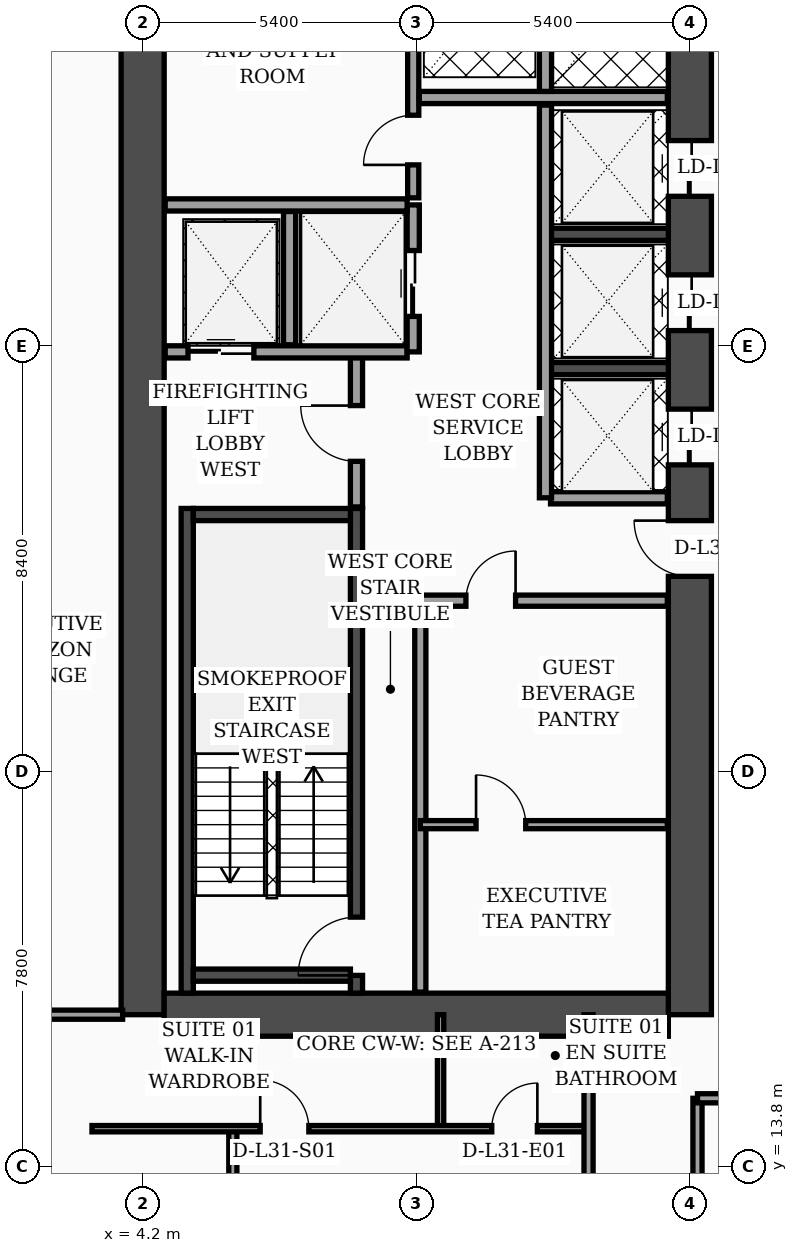
"""IFC4 building model, lengths in metres.
Left out: names, types, materials, properties, quantities, classifications, styles, units other than length and angle.
Written with IfcOpenShell. Run it as: python <this file> out.ifc"""

import sys

from ifc_helpers import new_model, si_unit, direction, frame, frame_2d, origin, place, context, subcontext, project, spatial, rectangle, extrude, element, fill, save


model = new_model("IFC4")
c1 = context("Model", 3, precision=1e-05, world=origin(), true_north=direction((0.0, 1.0)))
c2 = subcontext(c1, "Body", "Model", "MODEL_VIEW")
j1 = project(units=[si_unit("LENGTHUNIT", "METRE"), si_unit("PLANEANGLEUNIT", "RADIAN")], contexts=[c1])
p1 = place(None, origin())
s1 = spatial("IfcSite", under=j1, at=p1, CompositionType="ELEMENT")
p2 = place(p1, origin())
s2 = spatial("IfcBuilding", under=s1, at=p2, CompositionType="ELEMENT")
p3 = place(p2, frame((0.0, 0.0, 127.8)))
s3 = spatial("IfcBuildingStorey", under=s2, at=p3, CompositionType="ELEMENT", Elevation=127.8)
p4 = place(p3, frame((4.2, 16.8, 0.0), z_axis=(0.0, 0.0, 1.0), x_axis=(0.0, 1.0, 0.0)))
e1 = element("IfcWall", 1, at=p4, inside=s3, PredefinedType="SHEAR", context=c2, shape_type="SweptSolid", body=[
    extrude(rectangle(XDim=21.6, YDim=0.85, at=frame_2d((10.8, 0.0))), origin(), (0.0, 0.0, 1.0), 3.56),
])
p5 = place(p3, frame((15.0, 16.8, 0.0), z_axis=(0.0, 0.0, 1.0), x_axis=(0.0, 1.0, 0.0)))
e2 = element("IfcWall", 2, at=p5, inside=s3, PredefinedType="SHEAR", context=c2, shape_type="SweptSolid", body=[
    extrude(rectangle(XDim=21.6, YDim=0.85, at=frame_2d((10.8, 0.0))), origin(), (0.0, 0.0, 1.0), 3.56),
])
p6 = place(p5, frame((8.65, 0.0, 0.0)))
e3 = element("IfcOpeningElement", 3, at=p6, cuts=e2, PredefinedType="OPENING", context=c2, shape_type="SweptSolid", body=[
    extrude(rectangle(XDim=1.1, YDim=2.2, at=frame_2d((0.55, 1.1))), frame((0.0, 0.435, 0.0), z_axis=(0.0, -1.0, 0.0), x_axis=(1.0, 0.0, 0.0)), (0.0, 0.0, 1.0), 0.87),
])
p7 = place(p5, frame((10.85, 0.0, 0.0)))
e4 = element("IfcOpeningElement", 4, at=p7, cuts=e2, PredefinedType="OPENING", context=c2, shape_type="SweptSolid", body=[
    extrude(rectangle(XDim=1.1, YDim=2.2, at=frame_2d((0.55, 1.1))), frame((0.0, 0.435, 0.0), z_axis=(0.0, -1.0, 0.0), x_axis=(1.0, 0.0, 0.0)), (0.0, 0.0, 1.0), 0.87),
])
p8 = place(p5, frame((13.5, 0.0, 0.0)))
e5 = element("IfcOpeningElement", 5, at=p8, cuts=e2, PredefinedType="OPENING", context=c2, shape_type="SweptSolid", body=[
    extrude(rectangle(XDim=1.1, YDim=2.2, at=frame_2d((0.55, 1.1))), frame((0.0, 0.435, 0.0), z_axis=(0.0, -1.0, 0.0), x_axis=(1.0, 0.0, 0.0)), (0.0, 0.0, 1.0), 0.87),
])
p9 = place(p5, frame((16.15, 0.0, 0.0)))
e6 = element("IfcOpeningElement", 6, at=p9, cuts=e2, PredefinedType="OPENING", context=c2, shape_type="SweptSolid", body=[
    extrude(rectangle(XDim=1.1, YDim=2.2, at=frame_2d((0.55, 1.1))), frame((0.0, 0.435, 0.0), z_axis=(0.0, -1.0, 0.0), x_axis=(1.0, 0.0, 0.0)), (0.0, 0.0, 1.0), 0.87),
])
p10 = place(p3, frame((4.625, 16.8, 0.0), z_axis=(0.0, 0.0, 1.0), x_axis=(1.0, 0.0, 0.0)))
e7 = element("IfcWall", 7, at=p10, inside=s3, PredefinedType="SHEAR", context=c2, shape_type="SweptSolid", body=[
    extrude(rectangle(XDim=9.95, YDim=0.85, at=frame_2d((4.975, 0.0))), origin(), (0.0, 0.0, 1.0), 3.56),
])
p11 = place(p3, frame((5.08, 17.225, 0.0), z_axis=(0.0, 0.0, 1.0), x_axis=(0.0, 1.0, 0.0)))
e8 = element("IfcWall", 8, at=p11, inside=s3, PredefinedType="SOLIDWALL", context=c2, shape_type="SweptSolid", body=[
    extrude(rectangle(XDim=9.565, YDim=0.24, at=frame_2d((4.782, 0.0))), origin(), (0.0, 0.0, 1.0), 3.56),
])
p12 = place(p3, frame((8.42, 17.225, 0.0), z_axis=(0.0, 0.0, 1.0), x_axis=(0.0, 1.0, 0.0)))
e9 = element("IfcWall", 9, at=p12, inside=s3, PredefinedType="SOLIDWALL", context=c2, shape_type="SweptSolid", body=[
    extrude(rectangle(XDim=9.565, YDim=0.24, at=frame_2d((4.782, 0.0))), origin(), (0.0, 0.0, 1.0), 3.56),
])
p13 = place(p12, frame((0.35, 0.0, 0.0)))
e10 = element("IfcOpeningElement", 10, at=p13, cuts=e9, PredefinedType="OPENING", context=c2, shape_type="SweptSolid", body=[
    extrude(rectangle(XDim=1.15, YDim=2.2, at=frame_2d((0.575, 1.1))), frame((0.0, 0.13, 0.0), z_axis=(0.0, -1.0, 0.0), x_axis=(1.0, 0.0, 0.0)), (0.0, 0.0, 1.0), 0.26),
])
for number, where, z_axis, x_axis in (
    (11, (5.2, 17.58, 0.0), (0.0, 0.0, 1.0), (1.0, 0.0, 0.0)),
    (12, (5.2, 26.67, 0.0), (0.0, 0.0, 1.0), (1.0, 0.0, 0.0)),
):
    element("IfcWall", number, at=place(p3, frame(where, z_axis=z_axis, x_axis=x_axis)), inside=s3, PredefinedType="SOLIDWALL", context=c2, shape_type="SweptSolid", body=[
        extrude(rectangle(XDim=3.1, YDim=0.24, at=frame_2d((1.55, 0.0))), origin(), (0.0, 0.0, 1.0), 3.56),
    ])
for number, where, z_axis, x_axis in (
    (13, (12.18, 29.55, 0.0), (0.0, 0.0, 1.0), (1.0, 0.0, 0.0)),
    (14, (12.18, 32.2, 0.0), (0.0, 0.0, 1.0), (1.0, 0.0, 0.0)),
):
    element("IfcWall", number, at=place(p3, frame(where, z_axis=z_axis, x_axis=x_axis)), inside=s3, PredefinedType="SOLIDWALL", context=c2, shape_type="SweptSolid", body=[
        extrude(rectangle(XDim=2.395, YDim=0.24, at=frame_2d((1.198, 0.0))), origin(), (0.0, 0.0, 1.0), 3.56),
    ])
p14 = place(p3, frame((8.42, 26.82, 0.0), z_axis=(0.0, 0.0, 1.0), x_axis=(0.0, 1.0, 0.0)))
e15 = element("IfcWall", 15, at=p14, inside=s3, PredefinedType="SOLIDWALL", context=c2, shape_type="SweptSolid", body=[
    extrude(rectangle(XDim=3.0, YDim=0.24, at=frame_2d((1.5, 0.0))), origin(), (0.0, 0.0, 1.0), 3.56),
])
p15 = place(p14, frame((0.9, 0.0, 0.0)))
e16 = element("IfcOpeningElement", 16, at=p15, cuts=e15, PredefinedType="OPENING", context=c2, shape_type="SweptSolid", body=[
    extrude(rectangle(XDim=1.1, YDim=2.2, at=frame_2d((0.55, 1.1))), frame((0.0, 0.13, 0.0), z_axis=(0.0, -1.0, 0.0), x_axis=(1.0, 0.0, 0.0)), (0.0, 0.0, 1.0), 0.26),
])
p16 = place(p3, frame((4.645, 29.88, 0.0), z_axis=(0.0, 0.0, 1.0), x_axis=(1.0, 0.0, 0.0)))
e17 = element("IfcWall", 17, at=p16, inside=s3, PredefinedType="SOLIDWALL", context=c2, shape_type="SweptSolid", body=[
    extrude(rectangle(XDim=4.775, YDim=0.24, at=frame_2d((2.387, 0.0))), origin(), (0.0, 0.0, 1.0), 3.56),
])
p17 = place(p16, frame((0.45, 0.0, 0.0)))
e18 = element("IfcOpeningElement", 18, at=p17, cuts=e17, PredefinedType="OPENING", context=c2, shape_type="SweptSolid", body=[
    extrude(rectangle(XDim=1.3, YDim=2.35, at=frame_2d((0.65, 1.175))), frame((0.0, 0.13, 0.0), z_axis=(0.0, -1.0, 0.0), x_axis=(1.0, 0.0, 0.0)), (0.0, 0.0, 1.0), 0.26),
])
p18 = place(p3, frame((7.1, 30.02, 0.0), z_axis=(0.0, 0.0, 1.0), x_axis=(0.0, 1.0, 0.0)))
e19 = element("IfcWall", 19, at=p18, inside=s3, PredefinedType="SOLIDWALL", context=c2, shape_type="SweptSolid", body=[
    extrude(rectangle(XDim=2.63, YDim=0.24, at=frame_2d((1.315, 0.0))), origin(), (0.0, 0.0, 1.0), 3.56),
])
p19 = place(p3, frame((9.54, 29.88, 0.0), z_axis=(0.0, 0.0, 1.0), x_axis=(0.0, 1.0, 0.0)))
e20 = element("IfcWall", 20, at=p19, inside=s3, PredefinedType="SOLIDWALL", context=c2, shape_type="SweptSolid", body=[
    extrude(rectangle(XDim=2.9, YDim=0.24, at=frame_2d((1.45, 0.0))), origin(), (0.0, 0.0, 1.0), 3.56),
])
p20 = place(p19, frame((0.7, 0.0, 0.0)))
e21 = element("IfcOpeningElement", 21, at=p20, cuts=e20, PredefinedType="OPENING", context=c2, shape_type="SweptSolid", body=[
    extrude(rectangle(XDim=1.3, YDim=2.35, at=frame_2d((0.65, 1.175))), frame((0.0, 0.13, 0.0), z_axis=(0.0, -1.0, 0.0), x_axis=(1.0, 0.0, 0.0)), (0.0, 0.0, 1.0), 0.26),
])
p21 = place(p3, frame((4.645, 32.78, 0.0), z_axis=(0.0, 0.0, 1.0), x_axis=(1.0, 0.0, 0.0)))
e22 = element("IfcWall", 22, at=p21, inside=s3, PredefinedType="SOLIDWALL", context=c2, shape_type="SweptSolid", body=[
    extrude(rectangle(XDim=4.775, YDim=0.24, at=frame_2d((2.387, 0.0))), origin(), (0.0, 0.0, 1.0), 3.19),
])
p22 = place(p3, frame((9.68, 17.245, 0.0), z_axis=(0.0, 0.0, 1.0), x_axis=(0.0, 1.0, 0.0)))
e23 = element("IfcWall", 23, at=p22, inside=s3, PredefinedType="SOLIDWALL", context=c2, shape_type="SweptSolid", body=[
    extrude(rectangle(XDim=7.755, YDim=0.22, at=frame_2d((3.877, 0.0))), origin(), (0.0, 0.0, 1.0), 3.56),
])
p23 = place(p3, frame((9.54, 32.92, 0.0), z_axis=(0.0, 0.0, 1.0), x_axis=(0.0, 1.0, 0.0)))
e24 = element("IfcWall", 24, at=p23, inside=s3, PredefinedType="SOLIDWALL", context=c2, shape_type="SweptSolid", body=[
    extrude(rectangle(XDim=5.035, YDim=0.22, at=frame_2d((2.518, 0.0))), origin(), (0.0, 0.0, 1.0), 3.56),
])
p24 = place(p23, frame((0.65, 0.0, 0.0)))
e25 = element("IfcOpeningElement", 25, at=p24, cuts=e24, PredefinedType="OPENING", context=c2, shape_type="SweptSolid", body=[
    extrude(rectangle(XDim=0.98, YDim=2.15, at=frame_2d((0.49, 1.075))), frame((0.0, 0.12, 0.0), z_axis=(0.0, -1.0, 0.0), x_axis=(1.0, 0.0, 0.0)), (0.0, 0.0, 1.0), 0.24),
])
p25 = place(p3, frame((9.68, 20.55, 0.0), z_axis=(0.0, 0.0, 1.0), x_axis=(1.0, 0.0, 0.0)))
e26 = element("IfcWall", 26, at=p25, inside=s3, PredefinedType="PARTITIONING", context=c2, shape_type="SweptSolid", body=[
    extrude(rectangle(XDim=4.875, YDim=0.16, at=frame_2d((2.438, 0.0))), origin(), (0.0, 0.0, 1.0), 3.56),
])
p26 = place(p25, frame((1.1, 0.0, 0.0)))
e27 = element("IfcOpeningElement", 27, at=p26, cuts=e26, PredefinedType="OPENING", context=c2, shape_type="SweptSolid", body=[
    extrude(rectangle(XDim=0.98, YDim=2.15, at=frame_2d((0.49, 1.075))), frame((0.0, 0.09, 0.0), z_axis=(0.0, -1.0, 0.0), x_axis=(1.0, 0.0, 0.0)), (0.0, 0.0, 1.0), 0.18),
])
p27 = place(p3, frame((9.68, 24.97, 0.0), z_axis=(0.0, 0.0, 1.0), x_axis=(1.0, 0.0, 0.0)))
e28 = element("IfcWall", 28, at=p27, inside=s3, PredefinedType="SOLIDWALL", context=c2, shape_type="SweptSolid", body=[
    extrude(rectangle(XDim=4.875, YDim=0.22, at=frame_2d((2.438, 0.0))), origin(), (0.0, 0.0, 1.0), 2.84),
])
p28 = place(p27, frame((0.9, 0.0, 0.0)))
e29 = element("IfcOpeningElement", 29, at=p28, cuts=e28, PredefinedType="OPENING", context=c2, shape_type="SweptSolid", body=[
    extrude(rectangle(XDim=0.98, YDim=2.15, at=frame_2d((0.49, 1.075))), frame((0.0, 0.12, 0.0), z_axis=(0.0, -1.0, 0.0), x_axis=(1.0, 0.0, 0.0)), (0.0, 0.0, 1.0), 0.24),
])
p29 = place(p3, frame((12.25, 27.0, 0.0), z_axis=(0.0, 0.0, 1.0), x_axis=(1.0, 0.0, 0.0)))
e30 = element("IfcWall", 30, at=p29, inside=s3, PredefinedType="SOLIDWALL", context=c2, shape_type="SweptSolid", body=[
    extrude(rectangle(XDim=2.305, YDim=0.24, at=frame_2d((1.152, 0.0))), origin(), (0.0, 0.0, 1.0), 3.56),
])
p30 = place(p3, frame((12.15, 27.0, 0.0), z_axis=(0.0, 0.0, 1.0), x_axis=(0.0, 1.0, 0.0)))
e31 = element("IfcWall", 31, at=p30, inside=s3, PredefinedType="SOLIDWALL", context=c2, shape_type="SweptSolid", body=[
    extrude(rectangle(XDim=7.75, YDim=0.24, at=frame_2d((3.875, 0.0))), origin(), (0.0, 0.0, 1.0), 3.56),
])
p31 = place(p3, frame((9.66, 34.9, 0.0), z_axis=(0.0, 0.0, 1.0), x_axis=(1.0, 0.0, 0.0)))
e32 = element("IfcWall", 32, at=p31, inside=s3, PredefinedType="SOLIDWALL", context=c2, shape_type="SweptSolid", body=[
    extrude(rectangle(XDim=4.895, YDim=0.24, at=frame_2d((2.448, 0.0))), origin(), (0.0, 0.0, 1.0), 3.56),
])
p32 = place(p3, frame((12.15, 35.02, 0.0), z_axis=(0.0, 0.0, 1.0), x_axis=(0.0, 1.0, 0.0)))
e33 = element("IfcWall", 33, at=p32, inside=s3, PredefinedType="SOLIDWALL", context=c2, shape_type="SweptSolid", body=[
    extrude(rectangle(XDim=2.935, YDim=0.24, at=frame_2d((1.468, 0.0))), origin(), (0.0, 0.0, 1.0), 3.56),
])
p33 = place(p3, frame((0.08, 16.8, 0.0), z_axis=(0.0, 0.0, 1.0), x_axis=(1.0, 0.0, 0.0)))
e34 = element("IfcWall", 34, at=p33, inside=s3, PredefinedType="PARTITIONING", context=c2, shape_type="SweptSolid", body=[
    extrude(rectangle(XDim=3.725, YDim=0.18, at=frame_2d((1.862, 0.0))), origin(), (0.0, 0.0, 1.0), 2.84),
])
p34 = place(p3, frame((10.08, 14.55, 0.0), z_axis=(0.0, 0.0, 1.0), x_axis=(0.0, 1.0, 0.0)))
e35 = element("IfcWall", 35, at=p34, inside=s3, PredefinedType="PARTITIONING", context=c2, shape_type="SweptSolid", body=[
    extrude(rectangle(XDim=2.25, YDim=0.125, at=frame_2d((1.125, 0.0))), origin(), (0.0, 0.0, 1.0), 3.56),
])
p35 = place(p3, frame((5.98, 2.44, 0.0), z_axis=(0.0, 0.0, 1.0), x_axis=(0.0, 1.0, 0.0)))
e36 = element("IfcWall", 36, at=p35, inside=s3, PredefinedType="PARTITIONING", context=c2, shape_type="SweptSolid", body=[
    extrude(rectangle(XDim=12.11, YDim=0.16, at=frame_2d((6.055, 0.0))), origin(), (0.0, 0.0, 1.0), 3.04),
])
p36 = place(p35, frame((5.58, 0.0, 0.0)))
e37 = element("IfcOpeningElement", 37, at=p36, cuts=e36, PredefinedType="OPENING", context=c2, shape_type="SweptSolid", body=[
    extrude(rectangle(XDim=0.96, YDim=2.2, at=frame_2d((0.48, 1.1))), frame((0.0, 0.09, 0.0), z_axis=(0.0, -1.0, 0.0), x_axis=(1.0, 0.0, 0.0)), (0.0, 0.0, 1.0), 0.18),
])
p37 = place(p3, frame((3.2, 14.55, 0.0), z_axis=(0.0, 0.0, 1.0), x_axis=(1.0, 0.0, 0.0)))
e38 = element("IfcWall", 38, at=p37, inside=s3, PredefinedType="PARTITIONING", context=c2, shape_type="SweptSolid", body=[
    extrude(rectangle(XDim=9.8, YDim=0.125, at=frame_2d((4.9, 0.0))), origin(), (0.0, 0.0, 1.0), 2.84),
])
p38 = place(p37, frame((3.32, 0.0, 0.0)))
e39 = element("IfcOpeningElement", 39, at=p38, cuts=e38, PredefinedType="OPENING", context=c2, shape_type="SweptSolid", body=[
    extrude(rectangle(XDim=0.96, YDim=2.2, at=frame_2d((0.48, 1.1))), frame((0.0, 0.073, 0.0), z_axis=(0.0, -1.0, 0.0), x_axis=(1.0, 0.0, 0.0)), (0.0, 0.0, 1.0), 0.145),
])
p39 = place(p37, frame((7.89, 0.0, 0.0)))
e40 = element("IfcOpeningElement", 40, at=p39, cuts=e38, PredefinedType="OPENING", context=c2, shape_type="SweptSolid", body=[
    extrude(rectangle(XDim=0.9, YDim=2.15, at=frame_2d((0.45, 1.075))), frame((0.0, 0.073, 0.0), z_axis=(0.0, -1.0, 0.0), x_axis=(1.0, 0.0, 0.0)), (0.0, 0.0, 1.0), 0.145),
])
p40 = place(p3, frame((13.0, 2.44, 0.0), z_axis=(0.0, 0.0, 1.0), x_axis=(0.0, 1.0, 0.0)))
e41 = element("IfcWall", 41, at=p40, inside=s3, PredefinedType="PARTITIONING", context=c2, shape_type="SweptSolid", body=[
    extrude(rectangle(XDim=14.36, YDim=0.18, at=frame_2d((7.18, 0.0))), origin(), (0.0, 0.0, 1.0), 2.84),
])
p41 = place(p40, frame((3.01, 0.0, 0.0)))
e42 = element("IfcOpeningElement", 42, at=p41, cuts=e41, PredefinedType="OPENING", context=c2, shape_type="SweptSolid", body=[
    extrude(rectangle(XDim=1.02, YDim=2.2, at=frame_2d((0.51, 1.1))), frame((0.0, 0.1, 0.0), z_axis=(0.0, -1.0, 0.0), x_axis=(1.0, 0.0, 0.0)), (0.0, 0.0, 1.0), 0.2),
])
p42 = place(p3, frame((15.15, 2.44, 0.0), z_axis=(0.0, 0.0, 1.0), x_axis=(0.0, 1.0, 0.0)))
e43 = element("IfcWall", 43, at=p42, inside=s3, PredefinedType="PARTITIONING", context=c2, shape_type="SweptSolid", body=[
    extrude(rectangle(XDim=12.71, YDim=0.18, at=frame_2d((6.355, 0.0))), origin(), (0.0, 0.0, 1.0), 3.04),
])
p43 = place(p3, frame((15.15, 15.15, 0.0), z_axis=(0.0, 0.0, 1.0), x_axis=(1.0, 0.0, 0.0)))
e44 = element("IfcWall", 44, at=p43, inside=s3, PredefinedType="PARTITIONING", context=c2, shape_type="SweptSolid", body=[
    extrude(rectangle(XDim=6.45, YDim=0.18, at=frame_2d((3.225, 0.0))), origin(), (0.0, 0.0, 1.0), 2.49),
])
p44 = place(p43, frame((1.74, 0.0, 0.0)))
e45 = element("IfcOpeningElement", 45, at=p44, cuts=e44, PredefinedType="OPENING", context=c2, shape_type="SweptSolid", body=[
    extrude(rectangle(XDim=1.02, YDim=2.2, at=frame_2d((0.51, 1.1))), frame((0.0, 0.1, 0.0), z_axis=(0.0, -1.0, 0.0), x_axis=(1.0, 0.0, 0.0)), (0.0, 0.0, 1.0), 0.2),
])
p45 = place(p15, origin())
e46 = element("IfcDoor", 46, at=p45, inside=s3, OperationType="SINGLE_SWING_RIGHT", PredefinedType="DOOR", context=c2, shape_type="SweptSolid", body=[
    extrude(rectangle(XDim=1.1, YDim=2.2, at=frame_2d((0.55, 1.1))), frame((0.0, 0.025, 0.0), z_axis=(0.0, -1.0, 0.0), x_axis=(1.0, 0.0, 0.0)), (0.0, 0.0, 1.0), 0.05),
])
fill(e16, e46)
p46 = place(p17, origin())
e47 = element("IfcDoor", 47, at=p46, inside=s3, OperationType="DOUBLE_DOOR_SLIDING", PredefinedType="DOOR", context=c2, shape_type="SweptSolid", body=[
    extrude(rectangle(XDim=1.3, YDim=2.35, at=frame_2d((0.65, 1.175))), frame((0.0, 0.025, 0.0), z_axis=(0.0, -1.0, 0.0), x_axis=(1.0, 0.0, 0.0)), (0.0, 0.0, 1.0), 0.05),
])
fill(e18, e47)
p47 = place(p20, origin())
e48 = element("IfcDoor", 48, at=p47, inside=s3, OperationType="DOUBLE_DOOR_SLIDING", PredefinedType="DOOR", context=c2, shape_type="SweptSolid", body=[
    extrude(rectangle(XDim=1.3, YDim=2.35, at=frame_2d((0.65, 1.175))), frame((0.0, 0.025, 0.0), z_axis=(0.0, -1.0, 0.0), x_axis=(1.0, 0.0, 0.0)), (0.0, 0.0, 1.0), 0.05),
])
fill(e21, e48)
p48 = place(p24, origin())
e49 = element("IfcDoor", 49, at=p48, inside=s3, OperationType="SINGLE_SWING_LEFT", PredefinedType="DOOR", context=c2, shape_type="SweptSolid", body=[
    extrude(rectangle(XDim=0.98, YDim=2.15, at=frame_2d((0.49, 1.075))), frame((0.0, 0.025, 0.0), z_axis=(0.0, -1.0, 0.0), x_axis=(1.0, 0.0, 0.0)), (0.0, 0.0, 1.0), 0.05),
])
fill(e25, e49)
p49 = place(p26, origin())
e50 = element("IfcDoor", 50, at=p49, inside=s3, OperationType="SINGLE_SWING_LEFT", PredefinedType="DOOR", context=c2, shape_type="SweptSolid", body=[
    extrude(rectangle(XDim=0.98, YDim=2.15, at=frame_2d((0.49, 1.075))), frame((0.0, 0.025, 0.0), z_axis=(0.0, -1.0, 0.0), x_axis=(1.0, 0.0, 0.0)), (0.0, 0.0, 1.0), 0.05),
])
fill(e27, e50)
p50 = place(p28, origin())
e51 = element("IfcDoor", 51, at=p50, inside=s3, OperationType="SINGLE_SWING_RIGHT", PredefinedType="DOOR", context=c2, shape_type="SweptSolid", body=[
    extrude(rectangle(XDim=0.98, YDim=2.15, at=frame_2d((0.49, 1.075))), frame((0.0, 0.025, 0.0), z_axis=(0.0, -1.0, 0.0), x_axis=(1.0, 0.0, 0.0)), (0.0, 0.0, 1.0), 0.05),
])
fill(e29, e51)
p51 = place(p38, origin())
e52 = element("IfcDoor", 52, at=p51, inside=s3, OperationType="SINGLE_SWING_LEFT", PredefinedType="DOOR", context=c2, shape_type="SweptSolid", body=[
    extrude(rectangle(XDim=0.96, YDim=2.2, at=frame_2d((0.48, 1.1))), frame((0.0, 0.025, 0.0), z_axis=(0.0, -1.0, 0.0), x_axis=(1.0, 0.0, 0.0)), (0.0, 0.0, 1.0), 0.05),
])
fill(e39, e52)
p52 = place(p39, origin())
e53 = element("IfcDoor", 53, at=p52, inside=s3, OperationType="SINGLE_SWING_RIGHT", PredefinedType="DOOR", context=c2, shape_type="SweptSolid", body=[
    extrude(rectangle(XDim=0.9, YDim=2.15, at=frame_2d((0.45, 1.075))), frame((0.0, 0.025, 0.0), z_axis=(0.0, -1.0, 0.0), x_axis=(1.0, 0.0, 0.0)), (0.0, 0.0, 1.0), 0.05),
])
fill(e40, e53)
p53 = place(p13, origin())
e54 = element("IfcDoor", 54, at=p53, inside=s3, OperationType="SINGLE_SWING_LEFT", PredefinedType="DOOR", context=c2, shape_type="SweptSolid", body=[
    extrude(rectangle(XDim=1.15, YDim=2.2, at=frame_2d((0.575, 1.1))), frame((0.0, 0.025, 0.0), z_axis=(0.0, -1.0, 0.0), x_axis=(1.0, 0.0, 0.0)), (0.0, 0.0, 1.0), 0.05),
])
fill(e10, e54)
p54 = place(p6, origin())
e55 = element("IfcDoor", 55, at=p54, inside=s3, OperationType="SINGLE_SWING_RIGHT", PredefinedType="DOOR", context=c2, shape_type="SweptSolid", body=[
    extrude(rectangle(XDim=1.1, YDim=2.2, at=frame_2d((0.55, 1.1))), frame((0.0, 0.025, 0.0), z_axis=(0.0, -1.0, 0.0), x_axis=(1.0, 0.0, 0.0)), (0.0, 0.0, 1.0), 0.05),
])
fill(e3, e55)
p55 = place(p7, origin())
e56 = element("IfcDoor", 56, at=p55, inside=s3, OperationType="DOUBLE_DOOR_SLIDING", PredefinedType="DOOR", context=c2, shape_type="SweptSolid", body=[
    extrude(rectangle(XDim=1.1, YDim=2.2, at=frame_2d((0.55, 1.1))), frame((0.0, 0.025, 0.0), z_axis=(0.0, -1.0, 0.0), x_axis=(1.0, 0.0, 0.0)), (0.0, 0.0, 1.0), 0.05),
])
fill(e4, e56)
p56 = place(p8, origin())
e57 = element("IfcDoor", 57, at=p56, inside=s3, OperationType="DOUBLE_DOOR_SLIDING", PredefinedType="DOOR", context=c2, shape_type="SweptSolid", body=[
    extrude(rectangle(XDim=1.1, YDim=2.2, at=frame_2d((0.55, 1.1))), frame((0.0, 0.025, 0.0), z_axis=(0.0, -1.0, 0.0), x_axis=(1.0, 0.0, 0.0)), (0.0, 0.0, 1.0), 0.05),
])
fill(e5, e57)
p57 = place(p9, origin())
e58 = element("IfcDoor", 58, at=p57, inside=s3, OperationType="DOUBLE_DOOR_SLIDING", PredefinedType="DOOR", context=c2, shape_type="SweptSolid", body=[
    extrude(rectangle(XDim=1.1, YDim=2.2, at=frame_2d((0.55, 1.1))), frame((0.0, 0.025, 0.0), z_axis=(0.0, -1.0, 0.0), x_axis=(1.0, 0.0, 0.0)), (0.0, 0.0, 1.0), 0.05),
])
fill(e6, e58)
save(model, sys.argv[1])
